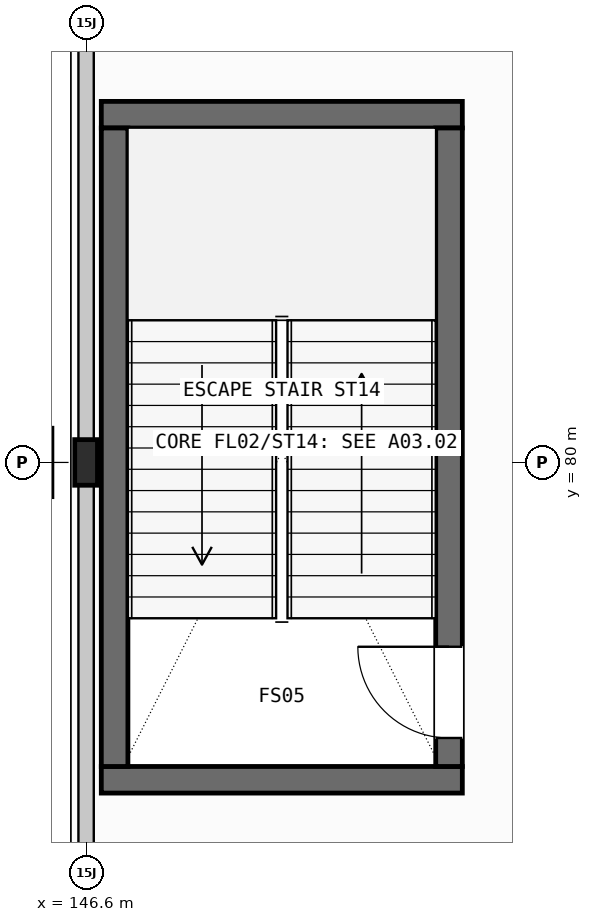
"""IFC4 building model, lengths in metres.
Left out: names, types, materials, properties, quantities, classifications, styles, units other than length and angle.
Written with IfcOpenShell. Run it as: python <this file> out.ifc"""

import sys

from ifc_helpers import new_model, si_unit, direction, frame, frame_2d, origin, origin_2d, place, context, subcontext, project, spatial, rectangle, i_section, extrude, element, fill, save


model = new_model("IFC4")
c1 = context("Model", 3, precision=1e-05, world=origin(), true_north=direction((0.0, 1.0)))
c2 = subcontext(c1, "Body", "Model", "MODEL_VIEW")
j1 = project(units=[si_unit("LENGTHUNIT", "METRE"), si_unit("PLANEANGLEUNIT", "RADIAN")], contexts=[c1])
p1 = place(None, origin())
s1 = spatial("IfcSite", under=j1, at=p1, CompositionType="ELEMENT")
p2 = place(p1, origin())
s2 = spatial("IfcBuilding", under=s1, at=p2, CompositionType="ELEMENT")
p3 = place(p2, frame((0.0, 0.0, 11.4)))
s3 = spatial("IfcBuildingStorey", under=s2, at=p3, CompositionType="ELEMENT", Elevation=11.4)
p4 = place(p3, frame((146.0, 80.0, 0.0), z_axis=(0.0, 0.0, 1.0), x_axis=(1.0, 0.0, 0.0)))
e1 = element("IfcColumn", 1, at=p4, inside=s3, PredefinedType="COLUMN", context=c2, shape_type="SweptSolid", body=[
    extrude(i_section(OverallWidth=0.3, OverallDepth=0.9, WebThickness=0.019, FlangeThickness=0.035, FilletRadius=0.03, at=origin_2d()), origin(), (0.0, 0.0, 1.0), 7.0),
])
p5 = place(p3, frame((146.6, 80.0, 0.0), z_axis=(0.0, 0.0, 1.0), x_axis=(1.0, 0.0, 0.0)))
e2 = element("IfcColumn", 2, at=p5, inside=s3, PredefinedType="COLUMN", context=c2, shape_type="SweptSolid", body=[
    extrude(i_section(OverallWidth=0.3, OverallDepth=0.6, WebThickness=0.015, FlangeThickness=0.03, FilletRadius=0.027, at=origin_2d()), origin(), (0.0, 0.0, 1.0), 5.4),
])
for number, where, z_axis, x_axis in (
    (3, (146.8, 75.825, 0.0), (0.0, 0.0, 1.0), (1.0, 0.0, 0.0)),
    (4, (146.8, 84.575, 0.0), (0.0, 0.0, 1.0), (1.0, 0.0, 0.0)),
):
    element("IfcWall", number, at=place(p3, frame(where, z_axis=z_axis, x_axis=x_axis)), inside=s3, PredefinedType="SHEAR", context=c2, shape_type="SweptSolid", body=[
        extrude(rectangle(XDim=4.75, YDim=0.35, at=frame_2d((2.375, 0.0))), origin(), (0.0, 0.0, 1.0), 5.4),
    ])
p6 = place(p3, frame((146.975, 76.0, 0.0), z_axis=(0.0, 0.0, 1.0), x_axis=(0.0, 1.0, 0.0)))
e5 = element("IfcWall", 5, at=p6, inside=s3, PredefinedType="SHEAR", context=c2, shape_type="SweptSolid", body=[
    extrude(rectangle(XDim=8.4, YDim=0.35, at=frame_2d((4.2, 0.0))), origin(), (0.0, 0.0, 1.0), 5.4),
])
p7 = place(p3, frame((151.375, 76.0, 0.0), z_axis=(0.0, 0.0, 1.0), x_axis=(0.0, 1.0, 0.0)))
e6 = element("IfcWall", 6, at=p7, inside=s3, PredefinedType="SHEAR", context=c2, shape_type="SweptSolid", body=[
    extrude(rectangle(XDim=8.4, YDim=0.35, at=frame_2d((4.2, 0.0))), origin(), (0.0, 0.0, 1.0), 5.4),
])
p8 = place(p7, frame((0.375, 0.0, 0.0)))
e7 = element("IfcOpeningElement", 7, at=p8, cuts=e6, PredefinedType="OPENING", context=c2, shape_type="SweptSolid", body=[
    extrude(rectangle(XDim=1.2, YDim=2.2, at=frame_2d((0.6, 1.1))), frame((0.0, 0.185, 0.0), z_axis=(0.0, -1.0, 0.0), x_axis=(1.0, 0.0, 0.0)), (0.0, 0.0, 1.0), 0.37),
])
for number, where, z_axis, x_axis in (
    (8, (146.6, 74.296, 0.0), (0.0, 0.0, 1.0), (0.0, 1.0, 0.0)),
    (9, (146.6, 80.296, 0.0), (0.0, 0.0, 1.0), (0.0, 1.0, 0.0)),
):
    element("IfcWall", number, at=place(p3, frame(where, z_axis=z_axis, x_axis=x_axis)), inside=s3, PredefinedType="STANDARD", context=c2, shape_type="SweptSolid", body=[
        extrude(rectangle(XDim=5.408, YDim=0.202, at=frame_2d((2.704, 0.0))), origin(), (0.0, 0.0, 1.0), 4.548),
    ])
p9 = place(p8, origin())
e10 = element("IfcDoor", 10, at=p9, inside=s3, OperationType="SINGLE_SWING_RIGHT", PredefinedType="DOOR", context=c2, shape_type="SweptSolid", body=[
    extrude(rectangle(XDim=1.2, YDim=2.2, at=frame_2d((0.6, 1.1))), frame((0.0, 0.025, 0.0), z_axis=(0.0, -1.0, 0.0), x_axis=(1.0, 0.0, 0.0)), (0.0, 0.0, 1.0), 0.05),
])
fill(e7, e10)
save(model, sys.argv[1])
